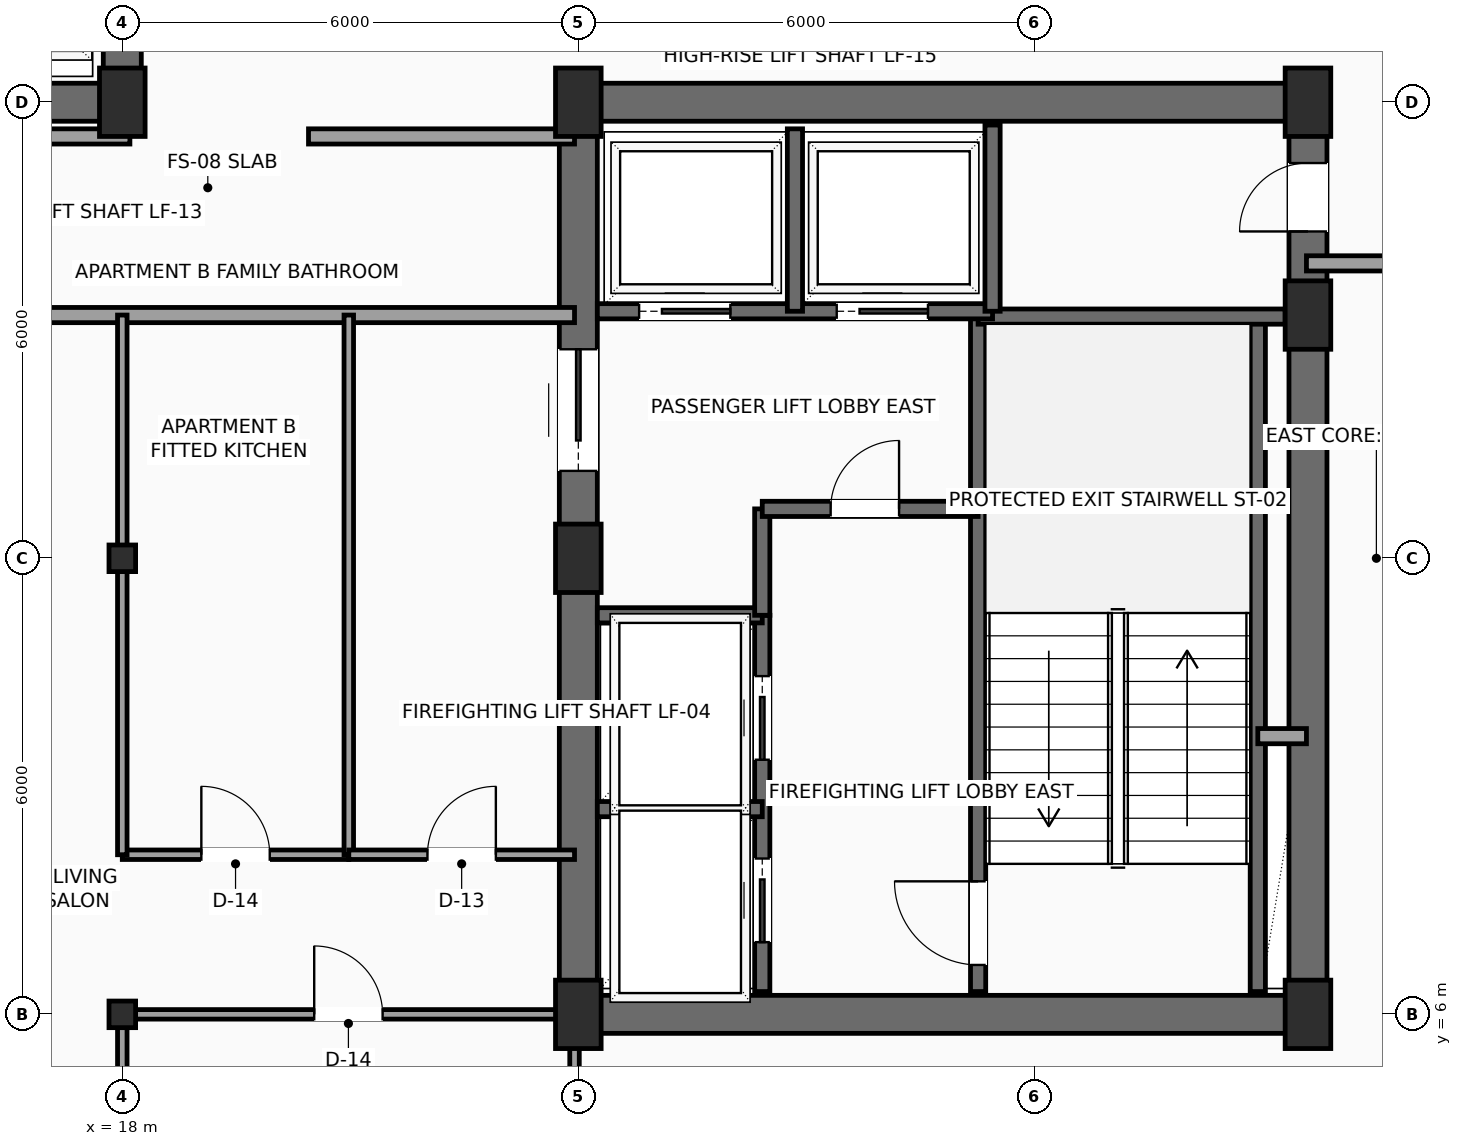
"""IFC4 building model, lengths in metres.
Left out: names, types, materials, properties, quantities, classifications, styles, units other than length and angle.
Written with IfcOpenShell. Run it as: python <this file> out.ifc"""

import sys

from ifc_helpers import new_model, si_unit, direction, frame, frame_2d, origin, origin_2d, place, context, subcontext, project, spatial, rectangle, hollow_rectangle, extrude, element, fill, save


model = new_model("IFC4")
c1 = context("Model", 3, precision=1e-05, world=origin(), true_north=direction((0.0, 1.0)))
c2 = subcontext(c1, "Body", "Model", "MODEL_VIEW")
j1 = project(units=[si_unit("LENGTHUNIT", "METRE"), si_unit("PLANEANGLEUNIT", "RADIAN")], contexts=[c1])
p1 = place(None, origin())
s1 = spatial("IfcSite", under=j1, at=p1, CompositionType="ELEMENT")
p2 = place(p1, origin())
s2 = spatial("IfcBuilding", under=s1, at=p2, CompositionType="ELEMENT")
p3 = place(p2, frame((0.0, 0.0, 250.2)))
s3 = spatial("IfcBuildingStorey", under=s2, at=p3, CompositionType="ELEMENT", Elevation=250.2)
for number, where, z_axis, x_axis in (
    (1, (18.0, 18.0, 0.0), (0.0, 0.0, 1.0), (1.0, 0.0, 0.0)),
    (2, (24.0, 6.0, 0.0), (0.0, 0.0, 1.0), (1.0, 0.0, 0.0)),
    (3, (24.0, 12.0, 0.0), (0.0, 0.0, 1.0), (1.0, 0.0, 0.0)),
    (4, (24.0, 18.0, 0.0), (0.0, 0.0, 1.0), (1.0, 0.0, 0.0)),
    (5, (33.6, 6.0, 0.0), (0.0, 0.0, 1.0), (1.0, 0.0, 0.0)),
    (6, (33.6, 15.2, 0.0), (0.0, 0.0, 1.0), (1.0, 0.0, 0.0)),
    (7, (33.6, 18.0, 0.0), (0.0, 0.0, 1.0), (1.0, 0.0, 0.0)),
):
    element("IfcColumn", number, at=place(p3, frame(where, z_axis=z_axis, x_axis=x_axis)), inside=s3, PredefinedType="COLUMN", context=c2, shape_type="SweptSolid", body=[
        extrude(rectangle(XDim=0.6, YDim=0.9, at=origin_2d()), origin(), (0.0, 0.0, 1.0), 3.5),
    ])
for number, where, z_axis, x_axis in (
    (8, (18.0, 6.0, 0.0), (0.0, 0.0, 1.0), (1.0, 0.0, 0.0)),
    (9, (18.0, 12.0, 0.0), (0.0, 0.0, 1.0), (1.0, 0.0, 0.0)),
):
    element("IfcColumn", number, at=place(p3, frame(where, z_axis=z_axis, x_axis=x_axis)), inside=s3, PredefinedType="COLUMN", context=c2, shape_type="SweptSolid", body=[
        extrude(hollow_rectangle(XDim=0.35, YDim=0.35, WallThickness=0.016, InnerFilletRadius=0.016, OuterFilletRadius=0.032, at=origin_2d()), origin(), (0.0, 0.0, 1.0), 3.5),
    ])
p4 = place(p3, frame((6.0, 18.0, 0.0), z_axis=(0.0, 0.0, 1.0), x_axis=(1.0, 0.0, 0.0)))
e10 = element("IfcWall", 10, at=p4, inside=s3, PredefinedType="SHEAR", context=c2, shape_type="SweptSolid", body=[
    extrude(rectangle(XDim=12.0, YDim=0.5, at=frame_2d((6.0, 0.0))), origin(), (0.0, 0.0, 1.0), 3.3),
])
p5 = place(p4, frame((7.15, 0.0, 0.0)))
e11 = element("IfcOpeningElement", 11, at=p5, cuts=e10, PredefinedType="OPENING", context=c2, shape_type="SweptSolid", body=[
    extrude(rectangle(XDim=1.6, YDim=2.3, at=frame_2d((0.8, 1.15))), frame((0.0, 0.26, 0.0), z_axis=(0.0, -1.0, 0.0), x_axis=(1.0, 0.0, 0.0)), (0.0, 0.0, 1.0), 0.52),
])
for number, where, z_axis, x_axis in (
    (12, (18.0, 18.0, 0.0), (0.0, 0.0, 1.0), (0.0, 1.0, 0.0)),
    (13, (24.0, 6.0, 0.0), (0.0, 0.0, 1.0), (1.0, 0.0, 0.0)),
    (14, (24.0, 18.0, 0.0), (0.0, 0.0, 1.0), (1.0, 0.0, 0.0)),
):
    element("IfcWall", number, at=place(p3, frame(where, z_axis=z_axis, x_axis=x_axis)), inside=s3, PredefinedType="SHEAR", context=c2, shape_type="SweptSolid", body=[
        extrude(rectangle(XDim=9.6, YDim=0.5, at=frame_2d((4.8, 0.0))), origin(), (0.0, 0.0, 1.0), 3.3),
    ])
p6 = place(p3, frame((24.0, 6.0, 0.0), z_axis=(0.0, 0.0, 1.0), x_axis=(0.0, 1.0, 0.0)))
e15 = element("IfcWall", 15, at=p6, inside=s3, PredefinedType="SHEAR", context=c2, shape_type="SweptSolid", body=[
    extrude(rectangle(XDim=12.0, YDim=0.5, at=frame_2d((6.0, 0.0))), origin(), (0.0, 0.0, 1.0), 3.3),
])
p7 = place(p6, frame((7.15, 0.0, 0.0)))
e16 = element("IfcOpeningElement", 16, at=p7, cuts=e15, PredefinedType="OPENING", context=c2, shape_type="SweptSolid", body=[
    extrude(rectangle(XDim=1.6, YDim=2.3, at=frame_2d((0.8, 1.15))), frame((0.0, 0.26, 0.0), z_axis=(0.0, -1.0, 0.0), x_axis=(1.0, 0.0, 0.0)), (0.0, 0.0, 1.0), 0.52),
])
p8 = place(p3, frame((33.6, 6.0, 0.0), z_axis=(0.0, 0.0, 1.0), x_axis=(0.0, 1.0, 0.0)))
e17 = element("IfcWall", 17, at=p8, inside=s3, PredefinedType="SHEAR", context=c2, shape_type="SweptSolid", body=[
    extrude(rectangle(XDim=12.0, YDim=0.5, at=frame_2d((6.0, 0.0))), origin(), (0.0, 0.0, 1.0), 3.3),
])
p9 = place(p8, frame((10.3, 0.0, 0.0)))
e18 = element("IfcOpeningElement", 18, at=p9, cuts=e17, PredefinedType="OPENING", context=c2, shape_type="SweptSolid", body=[
    extrude(rectangle(XDim=0.9, YDim=2.15, at=frame_2d((0.45, 1.075))), frame((0.0, 0.26, 0.0), z_axis=(0.0, -1.0, 0.0), x_axis=(1.0, 0.0, 0.0)), (0.0, 0.0, 1.0), 0.52),
])
p10 = place(p3, frame((29.26, 6.3, 0.0), z_axis=(0.0, 0.0, 1.0), x_axis=(0.0, 1.0, 0.0)))
e19 = element("IfcWall", 19, at=p10, inside=s3, PredefinedType="SHEAR", context=c2, shape_type="SweptSolid", body=[
    extrude(rectangle(XDim=8.88, YDim=0.2, at=frame_2d((4.44, 0.0))), origin(), (0.0, 0.0, 1.0), 3.3),
])
p11 = place(p10, frame((0.35, 0.0, 0.0)))
e20 = element("IfcOpeningElement", 20, at=p11, cuts=e19, PredefinedType="OPENING", context=c2, shape_type="SweptSolid", body=[
    extrude(rectangle(XDim=1.1, YDim=2.2, at=frame_2d((0.55, 1.1))), frame((0.0, 0.11, 0.0), z_axis=(0.0, -1.0, 0.0), x_axis=(1.0, 0.0, 0.0)), (0.0, 0.0, 1.0), 0.22),
])
p12 = place(p3, frame((32.94, 6.3, 0.0), z_axis=(0.0, 0.0, 1.0), x_axis=(0.0, 1.0, 0.0)))
e21 = element("IfcWall", 21, at=p12, inside=s3, PredefinedType="SHEAR", context=c2, shape_type="SweptSolid", body=[
    extrude(rectangle(XDim=8.88, YDim=0.2, at=frame_2d((4.44, 0.0))), origin(), (0.0, 0.0, 1.0), 3.3),
])
p13 = place(p3, frame((29.26, 15.18, 0.0), z_axis=(0.0, 0.0, 1.0), x_axis=(1.0, 0.0, 0.0)))
e22 = element("IfcWall", 22, at=p13, inside=s3, PredefinedType="SHEAR", context=c2, shape_type="SweptSolid", body=[
    extrude(rectangle(XDim=4.04, YDim=0.2, at=frame_2d((2.02, 0.0))), origin(), (0.0, 0.0, 1.0), 3.3),
])
p14 = place(p3, frame((26.42, 6.3, 0.0), z_axis=(0.0, 0.0, 1.0), x_axis=(0.0, 1.0, 0.0)))
e23 = element("IfcWall", 23, at=p14, inside=s3, PredefinedType="SHEAR", context=c2, shape_type="SweptSolid", body=[
    extrude(rectangle(XDim=4.95, YDim=0.2, at=frame_2d((2.475, 0.0))), origin(), (0.0, 0.0, 1.0), 3.3),
])
p15 = place(p14, frame((0.65, 0.0, 0.0)))
e24 = element("IfcOpeningElement", 24, at=p15, cuts=e23, PredefinedType="OPENING", context=c2, shape_type="SweptSolid", body=[
    extrude(rectangle(XDim=1.1, YDim=2.2, at=frame_2d((0.55, 1.1))), frame((0.0, 0.11, 0.0), z_axis=(0.0, -1.0, 0.0), x_axis=(1.0, 0.0, 0.0)), (0.0, 0.0, 1.0), 0.22),
])
p16 = place(p14, frame((3.05, 0.0, 0.0)))
e25 = element("IfcOpeningElement", 25, at=p16, cuts=e23, PredefinedType="OPENING", context=c2, shape_type="SweptSolid", body=[
    extrude(rectangle(XDim=1.1, YDim=2.2, at=frame_2d((0.55, 1.1))), frame((0.0, 0.11, 0.0), z_axis=(0.0, -1.0, 0.0), x_axis=(1.0, 0.0, 0.0)), (0.0, 0.0, 1.0), 0.22),
])
for number, where, z_axis, x_axis in (
    (26, (24.25, 8.7, 0.0), (0.0, 0.0, 1.0), (1.0, 0.0, 0.0)),
    (27, (24.25, 11.25, 0.0), (0.0, 0.0, 1.0), (1.0, 0.0, 0.0)),
):
    element("IfcWall", number, at=place(p3, frame(where, z_axis=z_axis, x_axis=x_axis)), inside=s3, PredefinedType="SHEAR", context=c2, shape_type="SweptSolid", body=[
        extrude(rectangle(XDim=2.17, YDim=0.2, at=frame_2d((1.085, 0.0))), origin(), (0.0, 0.0, 1.0), 3.3),
    ])
p17 = place(p3, frame((26.42, 11.25, 0.0), z_axis=(0.0, 0.0, 1.0), x_axis=(0.0, 1.0, 0.0)))
e28 = element("IfcWall", 28, at=p17, inside=s3, PredefinedType="SHEAR", context=c2, shape_type="SweptSolid", body=[
    extrude(rectangle(XDim=1.4, YDim=0.2, at=frame_2d((0.7, 0.0))), origin(), (0.0, 0.0, 1.0), 3.3),
])
p18 = place(p3, frame((26.42, 12.65, 0.0), z_axis=(0.0, 0.0, 1.0), x_axis=(1.0, 0.0, 0.0)))
e29 = element("IfcWall", 29, at=p18, inside=s3, PredefinedType="SHEAR", context=c2, shape_type="SweptSolid", body=[
    extrude(rectangle(XDim=2.84, YDim=0.2, at=frame_2d((1.42, 0.0))), origin(), (0.0, 0.0, 1.0), 3.3),
])
p19 = place(p18, frame((0.9, 0.0, 0.0)))
e30 = element("IfcOpeningElement", 30, at=p19, cuts=e29, PredefinedType="OPENING", context=c2, shape_type="SweptSolid", body=[
    extrude(rectangle(XDim=0.9, YDim=2.15, at=frame_2d((0.45, 1.075))), frame((0.0, 0.11, 0.0), z_axis=(0.0, -1.0, 0.0), x_axis=(1.0, 0.0, 0.0)), (0.0, 0.0, 1.0), 0.22),
])
p20 = place(p3, frame((32.94, 9.66, 0.0), z_axis=(0.0, 0.0, 1.0), x_axis=(1.0, 0.0, 0.0)))
e31 = element("IfcWall", 31, at=p20, inside=s3, PredefinedType="SOLIDWALL", context=c2, shape_type="SweptSolid", body=[
    extrude(rectangle(XDim=0.64, YDim=0.2, at=frame_2d((0.32, 0.0))), origin(), (0.0, 0.0, 1.0), 3.3),
])
p21 = place(p3, frame((24.25, 15.25, 0.0), z_axis=(0.0, 0.0, 1.0), x_axis=(1.0, 0.0, 0.0)))
e32 = element("IfcWall", 32, at=p21, inside=s3, PredefinedType="SHEAR", context=c2, shape_type="SweptSolid", body=[
    extrude(rectangle(XDim=5.2, YDim=0.2, at=frame_2d((2.6, 0.0))), origin(), (0.0, 0.0, 1.0), 3.3),
])
p22 = place(p21, frame((0.55, 0.0, 0.0)))
e33 = element("IfcOpeningElement", 33, at=p22, cuts=e32, PredefinedType="OPENING", context=c2, shape_type="SweptSolid", body=[
    extrude(rectangle(XDim=1.2, YDim=2.2, at=frame_2d((0.6, 1.1))), frame((0.0, 0.11, 0.0), z_axis=(0.0, -1.0, 0.0), x_axis=(1.0, 0.0, 0.0)), (0.0, 0.0, 1.0), 0.22),
])
p23 = place(p21, frame((3.15, 0.0, 0.0)))
e34 = element("IfcOpeningElement", 34, at=p23, cuts=e32, PredefinedType="OPENING", context=c2, shape_type="SweptSolid", body=[
    extrude(rectangle(XDim=1.2, YDim=2.2, at=frame_2d((0.6, 1.1))), frame((0.0, 0.11, 0.0), z_axis=(0.0, -1.0, 0.0), x_axis=(1.0, 0.0, 0.0)), (0.0, 0.0, 1.0), 0.22),
])
p24 = place(p3, frame((26.85, 15.25, 0.0), z_axis=(0.0, 0.0, 1.0), x_axis=(0.0, 1.0, 0.0)))
e35 = element("IfcWall", 35, at=p24, inside=s3, PredefinedType="SHEAR", context=c2, shape_type="SweptSolid", body=[
    extrude(rectangle(XDim=2.4, YDim=0.2, at=frame_2d((1.2, 0.0))), origin(), (0.0, 0.0, 1.0), 3.3),
])
p25 = place(p3, frame((29.45, 15.25, 0.0), z_axis=(0.0, 0.0, 1.0), x_axis=(0.0, 1.0, 0.0)))
e36 = element("IfcWall", 36, at=p25, inside=s3, PredefinedType="SHEAR", context=c2, shape_type="SweptSolid", body=[
    extrude(rectangle(XDim=2.45, YDim=0.2, at=frame_2d((1.225, 0.0))), origin(), (0.0, 0.0, 1.0), 3.3),
])
p26 = place(p3, frame((14.95, 17.55, 0.0), z_axis=(0.0, 0.0, 1.0), x_axis=(1.0, 0.0, 0.0)))
e37 = element("IfcWall", 37, at=p26, inside=s3, PredefinedType="SOLIDWALL", context=c2, shape_type="SweptSolid", body=[
    extrude(rectangle(XDim=3.15, YDim=0.2, at=frame_2d((1.575, 0.0))), origin(), (0.0, 0.0, 1.0), 3.3),
])
p27 = place(p3, frame((35.7, 15.88, 0.0), z_axis=(0.0, 0.0, 1.0), x_axis=(-1.0, 0.0, 0.0)))
e38 = element("IfcWall", 38, at=p27, inside=s3, PredefinedType="SOLIDWALL", context=c2, shape_type="SweptSolid", body=[
    extrude(rectangle(XDim=2.12, YDim=0.2, at=frame_2d((1.06, 0.0))), origin(), (0.0, 0.0, 1.0), 3.3),
])
p28 = place(p3, frame((20.45, 17.55, 0.0), z_axis=(0.0, 0.0, 1.0), x_axis=(1.0, 0.0, 0.0)))
e39 = element("IfcWall", 39, at=p28, inside=s3, PredefinedType="SOLIDWALL", context=c2, shape_type="SweptSolid", body=[
    extrude(rectangle(XDim=3.5, YDim=0.2, at=frame_2d((1.75, 0.0))), origin(), (0.0, 0.0, 1.0), 3.3),
])
p29 = place(p3, frame((23.95, 15.2, 0.0), z_axis=(0.0, 0.0, 1.0), x_axis=(-1.0, 0.0, 0.0)))
e40 = element("IfcWall", 40, at=p29, inside=s3, PredefinedType="SOLIDWALL", context=c2, shape_type="SweptSolid", body=[
    extrude(rectangle(XDim=9.0, YDim=0.2, at=frame_2d((4.5, 0.0))), origin(), (0.0, 0.0, 1.0), 2.932),
])
p30 = place(p29, frame((6.925, 0.0, 0.0)))
e41 = element("IfcOpeningElement", 41, at=p30, cuts=e40, PredefinedType="OPENING", context=c2, shape_type="SweptSolid", body=[
    extrude(rectangle(XDim=1.0, YDim=2.2, at=frame_2d((0.5, 1.1))), frame((0.0, 0.11, 0.0), z_axis=(0.0, -1.0, 0.0), x_axis=(1.0, 0.0, 0.0)), (0.0, 0.0, 1.0), 0.22),
])
p31 = place(p3, frame((18.0, 8.1, 0.0), z_axis=(0.0, 0.0, 1.0), x_axis=(1.0, 0.0, 0.0)))
e42 = element("IfcWall", 42, at=p31, inside=s3, PredefinedType="PARTITIONING", context=c2, shape_type="SweptSolid", body=[
    extrude(rectangle(XDim=2.98, YDim=0.125, at=frame_2d((1.49, 0.0))), origin(), (0.0, 0.0, 1.0), 3.3),
])
p32 = place(p31, frame((1.04, 0.0, 0.0)))
e43 = element("IfcOpeningElement", 43, at=p32, cuts=e42, PredefinedType="OPENING", context=c2, shape_type="SweptSolid", body=[
    extrude(rectangle(XDim=0.9, YDim=2.1, at=frame_2d((0.45, 1.05))), frame((0.0, 0.073, 0.0), z_axis=(0.0, -1.0, 0.0), x_axis=(1.0, 0.0, 0.0)), (0.0, 0.0, 1.0), 0.145),
])
p33 = place(p3, frame((18.0, 8.1, 0.0), z_axis=(0.0, 0.0, 1.0), x_axis=(0.0, 1.0, 0.0)))
e44 = element("IfcWall", 44, at=p33, inside=s3, PredefinedType="PARTITIONING", context=c2, shape_type="SweptSolid", body=[
    extrude(rectangle(XDim=7.1, YDim=0.125, at=frame_2d((3.55, 0.0))), origin(), (0.0, 0.0, 1.0), 2.992),
])
p34 = place(p3, frame((20.98, 8.1, 0.0), z_axis=(0.0, 0.0, 1.0), x_axis=(0.0, 1.0, 0.0)))
e45 = element("IfcWall", 45, at=p34, inside=s3, PredefinedType="PARTITIONING", context=c2, shape_type="SweptSolid", body=[
    extrude(rectangle(XDim=7.1, YDim=0.125, at=frame_2d((3.55, 0.0))), origin(), (0.0, 0.0, 1.0), 3.3),
])
p35 = place(p3, frame((20.98, 8.1, 0.0), z_axis=(0.0, 0.0, 1.0), x_axis=(1.0, 0.0, 0.0)))
e46 = element("IfcWall", 46, at=p35, inside=s3, PredefinedType="PARTITIONING", context=c2, shape_type="SweptSolid", body=[
    extrude(rectangle(XDim=2.97, YDim=0.125, at=frame_2d((1.485, 0.0))), origin(), (0.0, 0.0, 1.0), 3.3),
])
p36 = place(p35, frame((1.035, 0.0, 0.0)))
e47 = element("IfcOpeningElement", 47, at=p36, cuts=e46, PredefinedType="OPENING", context=c2, shape_type="SweptSolid", body=[
    extrude(rectangle(XDim=0.9, YDim=2.1, at=frame_2d((0.45, 1.05))), frame((0.0, 0.073, 0.0), z_axis=(0.0, -1.0, 0.0), x_axis=(1.0, 0.0, 0.0)), (0.0, 0.0, 1.0), 0.145),
])
p37 = place(p3, frame((18.0, 6.0, 0.0), z_axis=(0.0, 0.0, 1.0), x_axis=(1.0, 0.0, 0.0)))
e48 = element("IfcWall", 48, at=p37, inside=s3, PredefinedType="PARTITIONING", context=c2, shape_type="SweptSolid", body=[
    extrude(rectangle(XDim=5.95, YDim=0.125, at=frame_2d((2.975, 0.0))), origin(), (0.0, 0.0, 1.0), 2.992),
])
p38 = place(p37, frame((2.525, 0.0, 0.0)))
e49 = element("IfcOpeningElement", 49, at=p38, cuts=e48, PredefinedType="OPENING", context=c2, shape_type="SweptSolid", body=[
    extrude(rectangle(XDim=0.9, YDim=2.1, at=frame_2d((0.45, 1.05))), frame((0.0, 0.073, 0.0), z_axis=(0.0, -1.0, 0.0), x_axis=(1.0, 0.0, 0.0)), (0.0, 0.0, 1.0), 0.145),
])
p39 = place(p3, frame((18.0, 0.3, 0.0), z_axis=(0.0, 0.0, 1.0), x_axis=(0.0, 1.0, 0.0)))
e50 = element("IfcWall", 50, at=p39, inside=s3, PredefinedType="PARTITIONING", context=c2, shape_type="SweptSolid", body=[
    extrude(rectangle(XDim=5.7, YDim=0.125, at=frame_2d((2.85, 0.0))), origin(), (0.0, 0.0, 1.0), 2.967),
])
p40 = place(p3, frame((23.95, 0.3, 0.0), z_axis=(0.0, 0.0, 1.0), x_axis=(0.0, 1.0, 0.0)))
e51 = element("IfcWall", 51, at=p40, inside=s3, PredefinedType="PARTITIONING", context=c2, shape_type="SweptSolid", body=[
    extrude(rectangle(XDim=5.7, YDim=0.125, at=frame_2d((2.85, 0.0))), origin(), (0.0, 0.0, 1.0), 2.992),
])
p41 = place(p7, origin())
e52 = element("IfcDoor", 52, at=p41, inside=s3, OperationType="DOUBLE_DOOR_SLIDING", PredefinedType="DOOR", context=c2, shape_type="SweptSolid", body=[
    extrude(rectangle(XDim=1.6, YDim=2.3, at=frame_2d((0.8, 1.15))), frame((0.0, 0.025, 0.0), z_axis=(0.0, -1.0, 0.0), x_axis=(1.0, 0.0, 0.0)), (0.0, 0.0, 1.0), 0.05),
])
fill(e16, e52)
p42 = place(p9, origin())
e53 = element("IfcDoor", 53, at=p42, inside=s3, OperationType="SINGLE_SWING_LEFT", PredefinedType="DOOR", context=c2, shape_type="SweptSolid", body=[
    extrude(rectangle(XDim=0.9, YDim=2.15, at=frame_2d((0.45, 1.075))), frame((0.0, 0.025, 0.0), z_axis=(0.0, -1.0, 0.0), x_axis=(1.0, 0.0, 0.0)), (0.0, 0.0, 1.0), 0.05),
])
fill(e18, e53)
p43 = place(p11, origin())
e54 = element("IfcDoor", 54, at=p43, inside=s3, OperationType="SINGLE_SWING_RIGHT", PredefinedType="DOOR", context=c2, shape_type="SweptSolid", body=[
    extrude(rectangle(XDim=1.1, YDim=2.2, at=frame_2d((0.55, 1.1))), frame((0.0, 0.025, 0.0), z_axis=(0.0, -1.0, 0.0), x_axis=(1.0, 0.0, 0.0)), (0.0, 0.0, 1.0), 0.05),
])
fill(e20, e54)
p44 = place(p15, origin())
e55 = element("IfcDoor", 55, at=p44, inside=s3, OperationType="SLIDING_TO_LEFT", PredefinedType="DOOR", context=c2, shape_type="SweptSolid", body=[
    extrude(rectangle(XDim=1.1, YDim=2.2, at=frame_2d((0.55, 1.1))), frame((0.0, 0.025, 0.0), z_axis=(0.0, -1.0, 0.0), x_axis=(1.0, 0.0, 0.0)), (0.0, 0.0, 1.0), 0.05),
])
fill(e24, e55)
p45 = place(p16, origin())
e56 = element("IfcDoor", 56, at=p45, inside=s3, OperationType="SLIDING_TO_LEFT", PredefinedType="DOOR", context=c2, shape_type="SweptSolid", body=[
    extrude(rectangle(XDim=1.1, YDim=2.2, at=frame_2d((0.55, 1.1))), frame((0.0, 0.025, 0.0), z_axis=(0.0, -1.0, 0.0), x_axis=(1.0, 0.0, 0.0)), (0.0, 0.0, 1.0), 0.05),
])
fill(e25, e56)
p46 = place(p19, origin())
e57 = element("IfcDoor", 57, at=p46, inside=s3, OperationType="SINGLE_SWING_RIGHT", PredefinedType="DOOR", context=c2, shape_type="SweptSolid", body=[
    extrude(rectangle(XDim=0.9, YDim=2.15, at=frame_2d((0.45, 1.075))), frame((0.0, 0.025, 0.0), z_axis=(0.0, -1.0, 0.0), x_axis=(1.0, 0.0, 0.0)), (0.0, 0.0, 1.0), 0.05),
])
fill(e30, e57)
p47 = place(p22, origin())
e58 = element("IfcDoor", 58, at=p47, inside=s3, OperationType="SLIDING_TO_RIGHT", PredefinedType="DOOR", context=c2, shape_type="SweptSolid", body=[
    extrude(rectangle(XDim=1.2, YDim=2.2, at=frame_2d((0.6, 1.1))), frame((0.0, 0.025, 0.0), z_axis=(0.0, -1.0, 0.0), x_axis=(1.0, 0.0, 0.0)), (0.0, 0.0, 1.0), 0.05),
])
fill(e33, e58)
p48 = place(p23, origin())
e59 = element("IfcDoor", 59, at=p48, inside=s3, OperationType="SLIDING_TO_RIGHT", PredefinedType="DOOR", context=c2, shape_type="SweptSolid", body=[
    extrude(rectangle(XDim=1.2, YDim=2.2, at=frame_2d((0.6, 1.1))), frame((0.0, 0.025, 0.0), z_axis=(0.0, -1.0, 0.0), x_axis=(1.0, 0.0, 0.0)), (0.0, 0.0, 1.0), 0.05),
])
fill(e34, e59)
p49 = place(p32, origin())
e60 = element("IfcDoor", 60, at=p49, inside=s3, OperationType="SINGLE_SWING_LEFT", PredefinedType="DOOR", context=c2, shape_type="SweptSolid", body=[
    extrude(rectangle(XDim=0.9, YDim=2.1, at=frame_2d((0.45, 1.05))), frame((0.0, 0.025, 0.0), z_axis=(0.0, -1.0, 0.0), x_axis=(1.0, 0.0, 0.0)), (0.0, 0.0, 1.0), 0.05),
])
fill(e43, e60)
p50 = place(p36, origin())
e61 = element("IfcDoor", 61, at=p50, inside=s3, OperationType="SINGLE_SWING_RIGHT", PredefinedType="DOOR", context=c2, shape_type="SweptSolid", body=[
    extrude(rectangle(XDim=0.9, YDim=2.1, at=frame_2d((0.45, 1.05))), frame((0.0, 0.025, 0.0), z_axis=(0.0, -1.0, 0.0), x_axis=(1.0, 0.0, 0.0)), (0.0, 0.0, 1.0), 0.05),
])
fill(e47, e61)
p51 = place(p38, origin())
e62 = element("IfcDoor", 62, at=p51, inside=s3, OperationType="SINGLE_SWING_LEFT", PredefinedType="DOOR", context=c2, shape_type="SweptSolid", body=[
    extrude(rectangle(XDim=0.9, YDim=2.1, at=frame_2d((0.45, 1.05))), frame((0.0, 0.025, 0.0), z_axis=(0.0, -1.0, 0.0), x_axis=(1.0, 0.0, 0.0)), (0.0, 0.0, 1.0), 0.05),
])
fill(e49, e62)
save(model, sys.argv[1])
